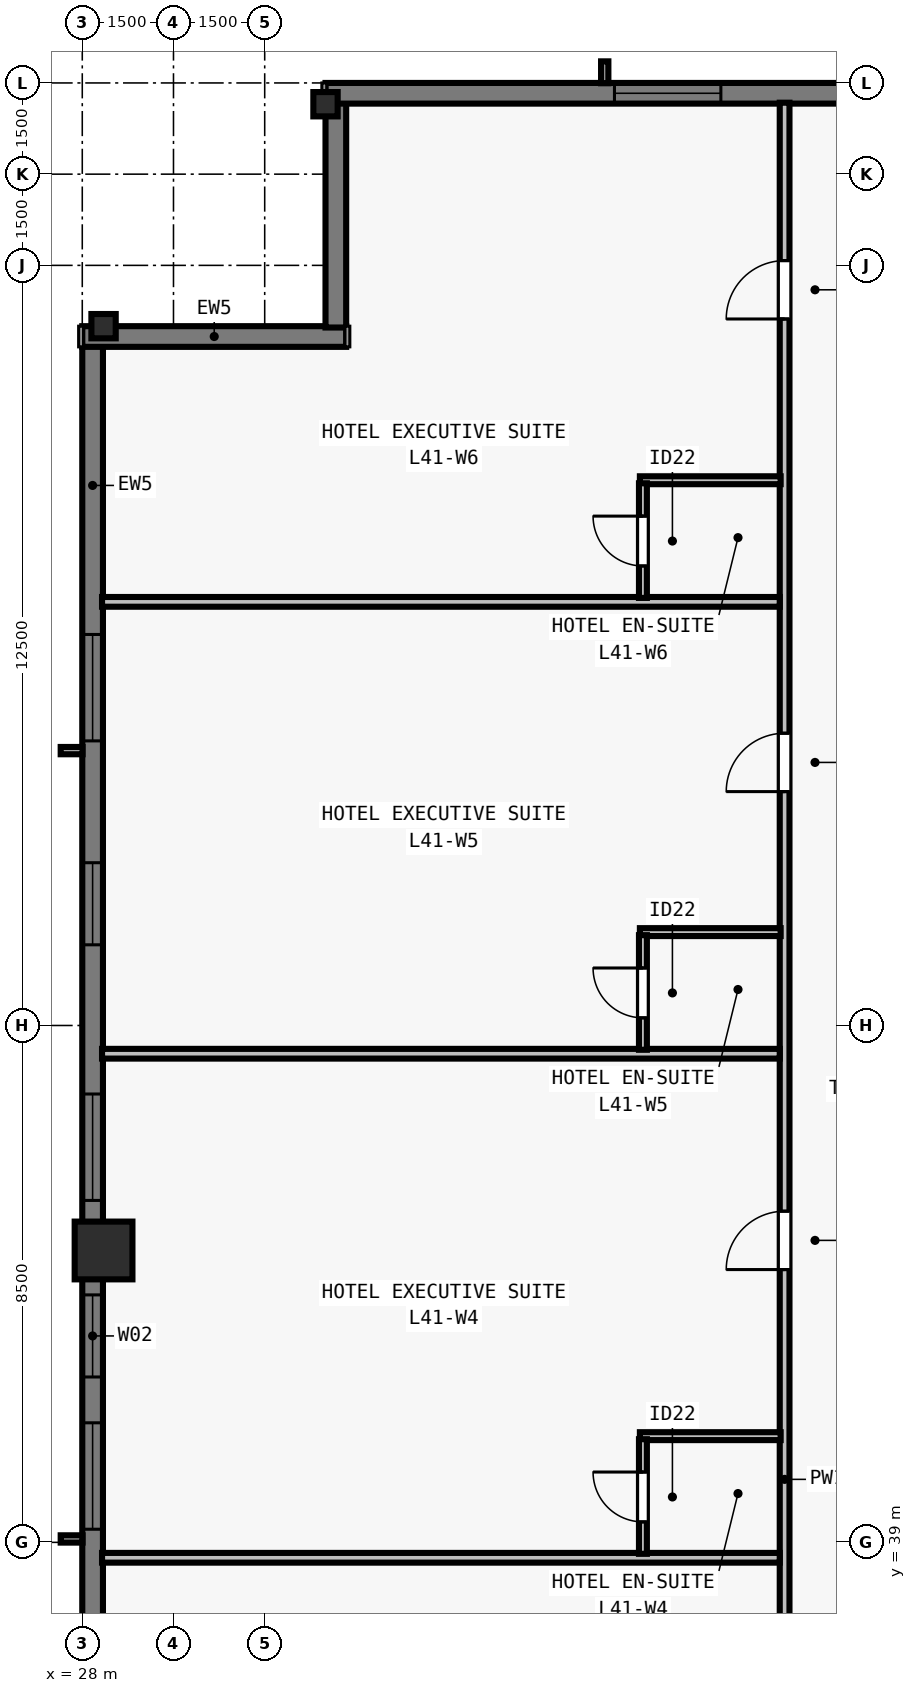
"""IFC4 building model, lengths in metres.
Left out: names, types, materials, properties, quantities, classifications, styles, units other than length and angle.
Written with IfcOpenShell. Run it as: python <this file> out.ifc"""

import sys

from ifc_helpers import new_model, si_unit, direction, frame, frame_2d, origin, origin_2d, place, context, subcontext, project, spatial, rectangle, i_section, extrude, element, fill, save


model = new_model("IFC4")
c1 = context("Model", 3, precision=1e-05, world=origin(), true_north=direction((0.0, 1.0)))
c2 = subcontext(c1, "Body", "Model", "MODEL_VIEW")
j1 = project(units=[si_unit("LENGTHUNIT", "METRE"), si_unit("PLANEANGLEUNIT", "RADIAN")], contexts=[c1])
p1 = place(None, origin())
s1 = spatial("IfcSite", under=j1, at=p1, CompositionType="ELEMENT")
p2 = place(p1, origin())
s2 = spatial("IfcBuilding", under=s1, at=p2, CompositionType="ELEMENT")
p3 = place(p2, frame((0.0, 0.0, 151.5)))
s3 = spatial("IfcBuildingStorey", under=s2, at=p3, CompositionType="ELEMENT", Elevation=151.5)
for number, where, z_axis, x_axis in (
    (1, (32.0, 62.65, 0.0), (0.0, 0.0, 1.0), (1.0, 0.0, 0.0)),
    (2, (28.35, 59.0, 0.0), (0.0, 0.0, 1.0), (0.0, 1.0, 0.0)),
):
    element("IfcColumn", number, at=place(p3, frame(where, z_axis=z_axis, x_axis=x_axis)), inside=s3, PredefinedType="COLUMN", context=c2, shape_type="SweptSolid", body=[
        extrude(i_section(OverallWidth=0.4, OverallDepth=0.4, WebThickness=0.022, FlangeThickness=0.036, at=origin_2d()), origin(), (0.0, 0.0, 1.0), 3.5),
    ])
p4 = place(p3, frame((28.35, 43.8, 0.0), z_axis=(0.0, 0.0, 1.0), x_axis=(0.0, 1.0, 0.0)))
e3 = element("IfcColumn", 3, at=p4, inside=s3, PredefinedType="COLUMN", context=c2, shape_type="SweptSolid", body=[
    extrude(rectangle(XDim=0.95, YDim=0.95, at=origin_2d()), origin(), (0.0, 0.0, 1.0), 3.5),
])
p5 = place(p3, frame((28.17, 19.0, 0.0), z_axis=(0.0, 0.0, 1.0), x_axis=(0.0, 1.0, 0.0)))
e4 = element("IfcWall", 4, at=p5, inside=s3, PredefinedType="SOLIDWALL", context=c2, shape_type="SweptSolid", body=[
    extrude(rectangle(XDim=39.682, YDim=0.34, at=frame_2d((19.841, 0.0))), origin(), (0.0, 0.0, 1.0), 3.28),
])
p6 = place(p5, frame((4.752, 0.0, 0.8)))
e5 = element("IfcOpeningElement", 5, at=p6, cuts=e4, PredefinedType="OPENING", context=c2, shape_type="SweptSolid", body=[
    extrude(rectangle(XDim=1.75, YDim=1.66, at=frame_2d((0.875, 0.83))), frame((0.0, 0.18, 0.0), z_axis=(0.0, -1.0, 0.0), x_axis=(1.0, 0.0, 0.0)), (0.0, 0.0, 1.0), 0.36),
])
p7 = place(p5, frame((8.505, 0.0, 0.8)))
e6 = element("IfcOpeningElement", 6, at=p7, cuts=e4, PredefinedType="OPENING", context=c2, shape_type="SweptSolid", body=[
    extrude(rectangle(XDim=1.35, YDim=1.66, at=frame_2d((0.675, 0.83))), frame((0.0, 0.18, 0.0), z_axis=(0.0, -1.0, 0.0), x_axis=(1.0, 0.0, 0.0)), (0.0, 0.0, 1.0), 0.36),
])
p8 = place(p5, frame((12.709, 0.0, 0.8)))
e7 = element("IfcOpeningElement", 7, at=p8, cuts=e4, PredefinedType="OPENING", context=c2, shape_type="SweptSolid", body=[
    extrude(rectangle(XDim=1.75, YDim=1.66, at=frame_2d((0.875, 0.83))), frame((0.0, 0.18, 0.0), z_axis=(0.0, -1.0, 0.0), x_axis=(1.0, 0.0, 0.0)), (0.0, 0.0, 1.0), 0.36),
])
p9 = place(p5, frame((16.062, 0.0, 0.8)))
e8 = element("IfcOpeningElement", 8, at=p9, cuts=e4, PredefinedType="OPENING", context=c2, shape_type="SweptSolid", body=[
    extrude(rectangle(XDim=1.35, YDim=1.66, at=frame_2d((0.675, 0.83))), frame((0.0, 0.18, 0.0), z_axis=(0.0, -1.0, 0.0), x_axis=(1.0, 0.0, 0.0)), (0.0, 0.0, 1.0), 0.36),
])
p10 = place(p5, frame((20.216, 0.0, 0.8)))
e9 = element("IfcOpeningElement", 9, at=p10, cuts=e4, PredefinedType="OPENING", context=c2, shape_type="SweptSolid", body=[
    extrude(rectangle(XDim=1.75, YDim=1.66, at=frame_2d((0.875, 0.83))), frame((0.0, 0.18, 0.0), z_axis=(0.0, -1.0, 0.0), x_axis=(1.0, 0.0, 0.0)), (0.0, 0.0, 1.0), 0.36),
])
p11 = place(p5, frame((22.719, 0.0, 0.8)))
e10 = element("IfcOpeningElement", 10, at=p11, cuts=e4, PredefinedType="OPENING", context=c2, shape_type="SweptSolid", body=[
    extrude(rectangle(XDim=1.35, YDim=1.66, at=frame_2d((0.675, 0.83))), frame((0.0, 0.18, 0.0), z_axis=(0.0, -1.0, 0.0), x_axis=(1.0, 0.0, 0.0)), (0.0, 0.0, 1.0), 0.36),
])
p12 = place(p5, frame((25.623, 0.0, 0.8)))
e11 = element("IfcOpeningElement", 11, at=p12, cuts=e4, PredefinedType="OPENING", context=c2, shape_type="SweptSolid", body=[
    extrude(rectangle(XDim=1.75, YDim=1.66, at=frame_2d((0.875, 0.83))), frame((0.0, 0.18, 0.0), z_axis=(0.0, -1.0, 0.0), x_axis=(1.0, 0.0, 0.0)), (0.0, 0.0, 1.0), 0.36),
])
p13 = place(p5, frame((29.827, 0.0, 0.8)))
e12 = element("IfcOpeningElement", 12, at=p13, cuts=e4, PredefinedType="OPENING", context=c2, shape_type="SweptSolid", body=[
    extrude(rectangle(XDim=1.35, YDim=1.66, at=frame_2d((0.675, 0.83))), frame((0.0, 0.18, 0.0), z_axis=(0.0, -1.0, 0.0), x_axis=(1.0, 0.0, 0.0)), (0.0, 0.0, 1.0), 0.36),
])
p14 = place(p5, frame((33.18, 0.0, 0.8)))
e13 = element("IfcOpeningElement", 13, at=p14, cuts=e4, PredefinedType="OPENING", context=c2, shape_type="SweptSolid", body=[
    extrude(rectangle(XDim=1.75, YDim=1.66, at=frame_2d((0.875, 0.83))), frame((0.0, 0.18, 0.0), z_axis=(0.0, -1.0, 0.0), x_axis=(1.0, 0.0, 0.0)), (0.0, 0.0, 1.0), 0.36),
])
p15 = place(p3, frame((28.0, 58.83, 0.0), z_axis=(0.0, 0.0, 1.0), x_axis=(1.0, 0.0, 0.0)))
e14 = element("IfcWall", 14, at=p15, inside=s3, PredefinedType="SOLIDWALL", context=c2, shape_type="SweptSolid", body=[
    extrude(rectangle(XDim=4.34, YDim=0.34, at=frame_2d((2.17, 0.0))), origin(), (0.0, 0.0, 1.0), 3.28),
])
p16 = place(p3, frame((32.17, 58.978, 0.0), z_axis=(0.0, 0.0, 1.0), x_axis=(0.0, 1.0, 0.0)))
e15 = element("IfcWall", 15, at=p16, inside=s3, PredefinedType="SOLIDWALL", context=c2, shape_type="SweptSolid", body=[
    extrude(rectangle(XDim=3.704, YDim=0.34, at=frame_2d((1.852, 0.0))), origin(), (0.0, 0.0, 1.0), 3.28),
])
p17 = place(p3, frame((32.0, 62.83, 0.0), z_axis=(0.0, 0.0, 1.0), x_axis=(1.0, 0.0, 0.0)))
e16 = element("IfcWall", 16, at=p17, inside=s3, PredefinedType="SOLIDWALL", context=c2, shape_type="SweptSolid", body=[
    extrude(rectangle(XDim=39.682, YDim=0.34, at=frame_2d((19.841, 0.0))), origin(), (0.0, 0.0, 1.0), 3.28),
])
p18 = place(p17, frame((4.752, 0.0, 0.8)))
e17 = element("IfcOpeningElement", 17, at=p18, cuts=e16, PredefinedType="OPENING", context=c2, shape_type="SweptSolid", body=[
    extrude(rectangle(XDim=1.75, YDim=1.66, at=frame_2d((0.875, 0.83))), frame((0.0, 0.18, 0.0), z_axis=(0.0, -1.0, 0.0), x_axis=(1.0, 0.0, 0.0)), (0.0, 0.0, 1.0), 0.36),
])
p19 = place(p17, frame((11.859, 0.0, 0.8)))
e18 = element("IfcOpeningElement", 18, at=p19, cuts=e16, PredefinedType="OPENING", context=c2, shape_type="SweptSolid", body=[
    extrude(rectangle(XDim=1.75, YDim=1.66, at=frame_2d((0.875, 0.83))), frame((0.0, 0.18, 0.0), z_axis=(0.0, -1.0, 0.0), x_axis=(1.0, 0.0, 0.0)), (0.0, 0.0, 1.0), 0.36),
])
p20 = place(p17, frame((16.062, 0.0, 0.8)))
e19 = element("IfcOpeningElement", 19, at=p20, cuts=e16, PredefinedType="OPENING", context=c2, shape_type="SweptSolid", body=[
    extrude(rectangle(XDim=1.35, YDim=1.66, at=frame_2d((0.675, 0.83))), frame((0.0, 0.18, 0.0), z_axis=(0.0, -1.0, 0.0), x_axis=(1.0, 0.0, 0.0)), (0.0, 0.0, 1.0), 0.36),
])
p21 = place(p17, frame((17.716, 0.0, 0.8)))
e20 = element("IfcOpeningElement", 20, at=p21, cuts=e16, PredefinedType="OPENING", context=c2, shape_type="SweptSolid", body=[
    extrude(rectangle(XDim=1.75, YDim=1.66, at=frame_2d((0.875, 0.83))), frame((0.0, 0.18, 0.0), z_axis=(0.0, -1.0, 0.0), x_axis=(1.0, 0.0, 0.0)), (0.0, 0.0, 1.0), 0.36),
])
p22 = place(p17, frame((22.719, 0.0, 0.8)))
e21 = element("IfcOpeningElement", 21, at=p22, cuts=e16, PredefinedType="OPENING", context=c2, shape_type="SweptSolid", body=[
    extrude(rectangle(XDim=1.35, YDim=1.66, at=frame_2d((0.675, 0.83))), frame((0.0, 0.18, 0.0), z_axis=(0.0, -1.0, 0.0), x_axis=(1.0, 0.0, 0.0)), (0.0, 0.0, 1.0), 0.36),
])
p23 = place(p17, frame((26.073, 0.0, 0.8)))
e22 = element("IfcOpeningElement", 22, at=p23, cuts=e16, PredefinedType="OPENING", context=c2, shape_type="SweptSolid", body=[
    extrude(rectangle(XDim=1.75, YDim=1.66, at=frame_2d((0.875, 0.83))), frame((0.0, 0.18, 0.0), z_axis=(0.0, -1.0, 0.0), x_axis=(1.0, 0.0, 0.0)), (0.0, 0.0, 1.0), 0.36),
])
p24 = place(p17, frame((29.827, 0.0, 0.8)))
e23 = element("IfcOpeningElement", 23, at=p24, cuts=e16, PredefinedType="OPENING", context=c2, shape_type="SweptSolid", body=[
    extrude(rectangle(XDim=1.35, YDim=1.66, at=frame_2d((0.675, 0.83))), frame((0.0, 0.18, 0.0), z_axis=(0.0, -1.0, 0.0), x_axis=(1.0, 0.0, 0.0)), (0.0, 0.0, 1.0), 0.36),
])
p25 = place(p3, frame((39.55, 15.325, 0.0), z_axis=(0.0, 0.0, 1.0), x_axis=(0.0, 1.0, 0.0)))
e24 = element("IfcWall", 24, at=p25, inside=s3, PredefinedType="PARTITIONING", context=c2, shape_type="SweptSolid", body=[
    extrude(rectangle(XDim=47.35, YDim=0.16, at=frame_2d((23.675, 0.0))), origin(), (0.0, 0.0, 1.0), 2.555),
])
p26 = place(p25, frame((4.718, 0.0, 0.0)))
e25 = element("IfcOpeningElement", 25, at=p26, cuts=e24, PredefinedType="OPENING", context=c2, shape_type="SweptSolid", body=[
    extrude(rectangle(XDim=0.96, YDim=2.15, at=frame_2d((0.48, 1.075))), frame((0.0, 0.09, 0.0), z_axis=(0.0, -1.0, 0.0), x_axis=(1.0, 0.0, 0.0)), (0.0, 0.0, 1.0), 0.18),
])
p27 = place(p25, frame((12.441, 0.0, 0.0)))
e26 = element("IfcOpeningElement", 26, at=p27, cuts=e24, PredefinedType="OPENING", context=c2, shape_type="SweptSolid", body=[
    extrude(rectangle(XDim=0.96, YDim=2.15, at=frame_2d((0.48, 1.075))), frame((0.0, 0.09, 0.0), z_axis=(0.0, -1.0, 0.0), x_axis=(1.0, 0.0, 0.0)), (0.0, 0.0, 1.0), 0.18),
])
p28 = place(p25, frame((20.301, 0.0, 0.0)))
e27 = element("IfcOpeningElement", 27, at=p28, cuts=e24, PredefinedType="OPENING", context=c2, shape_type="SweptSolid", body=[
    extrude(rectangle(XDim=0.96, YDim=2.15, at=frame_2d((0.48, 1.075))), frame((0.0, 0.09, 0.0), z_axis=(0.0, -1.0, 0.0), x_axis=(1.0, 0.0, 0.0)), (0.0, 0.0, 1.0), 0.18),
])
p29 = place(p25, frame((28.161, 0.0, 0.0)))
e28 = element("IfcOpeningElement", 28, at=p29, cuts=e24, PredefinedType="OPENING", context=c2, shape_type="SweptSolid", body=[
    extrude(rectangle(XDim=0.96, YDim=2.15, at=frame_2d((0.48, 1.075))), frame((0.0, 0.09, 0.0), z_axis=(0.0, -1.0, 0.0), x_axis=(1.0, 0.0, 0.0)), (0.0, 0.0, 1.0), 0.18),
])
p30 = place(p25, frame((36.021, 0.0, 0.0)))
e29 = element("IfcOpeningElement", 29, at=p30, cuts=e24, PredefinedType="OPENING", context=c2, shape_type="SweptSolid", body=[
    extrude(rectangle(XDim=0.96, YDim=2.15, at=frame_2d((0.48, 1.075))), frame((0.0, 0.09, 0.0), z_axis=(0.0, -1.0, 0.0), x_axis=(1.0, 0.0, 0.0)), (0.0, 0.0, 1.0), 0.18),
])
p31 = place(p25, frame((43.793, 0.0, 0.0)))
e30 = element("IfcOpeningElement", 30, at=p31, cuts=e24, PredefinedType="OPENING", context=c2, shape_type="SweptSolid", body=[
    extrude(rectangle(XDim=0.96, YDim=2.15, at=frame_2d((0.48, 1.075))), frame((0.0, 0.09, 0.0), z_axis=(0.0, -1.0, 0.0), x_axis=(1.0, 0.0, 0.0)), (0.0, 0.0, 1.0), 0.18),
])
p32 = place(p3, frame((28.325, 38.747, 0.0), z_axis=(0.0, 0.0, 1.0), x_axis=(1.0, 0.0, 0.0)))
e31 = element("IfcWall", 31, at=p32, inside=s3, PredefinedType="PARTITIONING", context=c2, shape_type="SweptSolid", body=[
    extrude(rectangle(XDim=11.145, YDim=0.16, at=frame_2d((5.573, 0.0))), origin(), (0.0, 0.0, 1.0), 2.896),
])
p33 = place(p3, frame((37.17, 40.747, 0.0), z_axis=(0.0, 0.0, 1.0), x_axis=(1.0, 0.0, 0.0)))
e32 = element("IfcWall", 32, at=p33, inside=s3, PredefinedType="PLUMBINGWALL", context=c2, shape_type="SweptSolid", body=[
    extrude(rectangle(XDim=2.315, YDim=0.13, at=frame_2d((1.158, 0.0))), origin(), (0.0, 0.0, 1.0), 3.28),
])
p34 = place(p3, frame((37.22, 38.812, 0.0), z_axis=(0.0, 0.0, 1.0), x_axis=(0.0, 1.0, 0.0)))
e33 = element("IfcWall", 33, at=p34, inside=s3, PredefinedType="PLUMBINGWALL", context=c2, shape_type="SweptSolid", body=[
    extrude(rectangle(XDim=1.885, YDim=0.13, at=frame_2d((0.942, 0.0))), origin(), (0.0, 0.0, 1.0), 3.28),
])
p35 = place(p34, frame((0.525, 0.0, 0.0)))
e34 = element("IfcOpeningElement", 34, at=p35, cuts=e33, PredefinedType="OPENING", context=c2, shape_type="SweptSolid", body=[
    extrude(rectangle(XDim=0.82, YDim=2.1, at=frame_2d((0.41, 1.05))), frame((0.0, 0.075, 0.0), z_axis=(0.0, -1.0, 0.0), x_axis=(1.0, 0.0, 0.0)), (0.0, 0.0, 1.0), 0.15),
])
p36 = place(p3, frame((28.325, 47.035, 0.0), z_axis=(0.0, 0.0, 1.0), x_axis=(1.0, 0.0, 0.0)))
e35 = element("IfcWall", 35, at=p36, inside=s3, PredefinedType="PARTITIONING", context=c2, shape_type="SweptSolid", body=[
    extrude(rectangle(XDim=11.145, YDim=0.16, at=frame_2d((5.573, 0.0))), origin(), (0.0, 0.0, 1.0), 3.28),
])
p37 = place(p3, frame((37.17, 49.035, 0.0), z_axis=(0.0, 0.0, 1.0), x_axis=(1.0, 0.0, 0.0)))
e36 = element("IfcWall", 36, at=p37, inside=s3, PredefinedType="PLUMBINGWALL", context=c2, shape_type="SweptSolid", body=[
    extrude(rectangle(XDim=2.315, YDim=0.13, at=frame_2d((1.158, 0.0))), origin(), (0.0, 0.0, 1.0), 3.28),
])
p38 = place(p3, frame((37.22, 47.101, 0.0), z_axis=(0.0, 0.0, 1.0), x_axis=(0.0, 1.0, 0.0)))
e37 = element("IfcWall", 37, at=p38, inside=s3, PredefinedType="PLUMBINGWALL", context=c2, shape_type="SweptSolid", body=[
    extrude(rectangle(XDim=1.885, YDim=0.13, at=frame_2d((0.942, 0.0))), origin(), (0.0, 0.0, 1.0), 3.28),
])
p39 = place(p38, frame((0.525, 0.0, 0.0)))
e38 = element("IfcOpeningElement", 38, at=p39, cuts=e37, PredefinedType="OPENING", context=c2, shape_type="SweptSolid", body=[
    extrude(rectangle(XDim=0.82, YDim=2.1, at=frame_2d((0.41, 1.05))), frame((0.0, 0.075, 0.0), z_axis=(0.0, -1.0, 0.0), x_axis=(1.0, 0.0, 0.0)), (0.0, 0.0, 1.0), 0.15),
])
p40 = place(p3, frame((28.325, 54.467, 0.0), z_axis=(0.0, 0.0, 1.0), x_axis=(1.0, 0.0, 0.0)))
e39 = element("IfcWall", 39, at=p40, inside=s3, PredefinedType="PARTITIONING", context=c2, shape_type="SweptSolid", body=[
    extrude(rectangle(XDim=11.145, YDim=0.16, at=frame_2d((5.573, 0.0))), origin(), (0.0, 0.0, 1.0), 2.896),
])
p41 = place(p3, frame((37.17, 56.467, 0.0), z_axis=(0.0, 0.0, 1.0), x_axis=(1.0, 0.0, 0.0)))
e40 = element("IfcWall", 40, at=p41, inside=s3, PredefinedType="PLUMBINGWALL", context=c2, shape_type="SweptSolid", body=[
    extrude(rectangle(XDim=2.315, YDim=0.13, at=frame_2d((1.158, 0.0))), origin(), (0.0, 0.0, 1.0), 3.28),
])
p42 = place(p3, frame((37.22, 54.531, 0.0), z_axis=(0.0, 0.0, 1.0), x_axis=(0.0, 1.0, 0.0)))
e41 = element("IfcWall", 41, at=p42, inside=s3, PredefinedType="PLUMBINGWALL", context=c2, shape_type="SweptSolid", body=[
    extrude(rectangle(XDim=1.885, YDim=0.13, at=frame_2d((0.942, 0.0))), origin(), (0.0, 0.0, 1.0), 2.555),
])
p43 = place(p42, frame((0.525, 0.0, 0.0)))
e42 = element("IfcOpeningElement", 42, at=p43, cuts=e41, PredefinedType="OPENING", context=c2, shape_type="SweptSolid", body=[
    extrude(rectangle(XDim=0.82, YDim=2.1, at=frame_2d((0.41, 1.05))), frame((0.0, 0.075, 0.0), z_axis=(0.0, -1.0, 0.0), x_axis=(1.0, 0.0, 0.0)), (0.0, 0.0, 1.0), 0.15),
])
p44 = place(p10, origin())
e43 = element("IfcWindow", 43, at=p44, inside=s3, PartitioningType="SINGLE_PANEL", PredefinedType="WINDOW", context=c2, shape_type="SweptSolid", body=[
    extrude(rectangle(XDim=1.75, YDim=1.66, at=frame_2d((0.875, 0.83))), frame((0.0, -0.05, 0.0), z_axis=(0.0, -1.0, 0.0), x_axis=(1.0, 0.0, 0.0)), (0.0, 0.0, 1.0), 0.06),
])
fill(e9, e43)
p45 = place(p11, origin())
e44 = element("IfcWindow", 44, at=p45, inside=s3, PartitioningType="SINGLE_PANEL", PredefinedType="WINDOW", context=c2, shape_type="SweptSolid", body=[
    extrude(rectangle(XDim=1.35, YDim=1.66, at=frame_2d((0.675, 0.83))), frame((0.0, -0.05, 0.0), z_axis=(0.0, -1.0, 0.0), x_axis=(1.0, 0.0, 0.0)), (0.0, 0.0, 1.0), 0.06),
])
fill(e10, e44)
p46 = place(p12, origin())
e45 = element("IfcWindow", 45, at=p46, inside=s3, PartitioningType="SINGLE_PANEL", PredefinedType="WINDOW", context=c2, shape_type="SweptSolid", body=[
    extrude(rectangle(XDim=1.75, YDim=1.66, at=frame_2d((0.875, 0.83))), frame((0.0, -0.05, 0.0), z_axis=(0.0, -1.0, 0.0), x_axis=(1.0, 0.0, 0.0)), (0.0, 0.0, 1.0), 0.06),
])
fill(e11, e45)
p47 = place(p13, origin())
e46 = element("IfcWindow", 46, at=p47, inside=s3, PartitioningType="SINGLE_PANEL", PredefinedType="WINDOW", context=c2, shape_type="SweptSolid", body=[
    extrude(rectangle(XDim=1.35, YDim=1.66, at=frame_2d((0.675, 0.83))), frame((0.0, -0.05, 0.0), z_axis=(0.0, -1.0, 0.0), x_axis=(1.0, 0.0, 0.0)), (0.0, 0.0, 1.0), 0.06),
])
fill(e12, e46)
p48 = place(p14, origin())
e47 = element("IfcWindow", 47, at=p48, inside=s3, PartitioningType="SINGLE_PANEL", PredefinedType="WINDOW", context=c2, shape_type="SweptSolid", body=[
    extrude(rectangle(XDim=1.75, YDim=1.66, at=frame_2d((0.875, 0.83))), frame((0.0, -0.05, 0.0), z_axis=(0.0, -1.0, 0.0), x_axis=(1.0, 0.0, 0.0)), (0.0, 0.0, 1.0), 0.06),
])
fill(e13, e47)
p49 = place(p18, origin())
e48 = element("IfcWindow", 48, at=p49, inside=s3, PartitioningType="SINGLE_PANEL", PredefinedType="WINDOW", context=c2, shape_type="SweptSolid", body=[
    extrude(rectangle(XDim=1.75, YDim=1.66, at=frame_2d((0.875, 0.83))), frame((0.0, -0.05, 0.0), z_axis=(0.0, -1.0, 0.0), x_axis=(1.0, 0.0, 0.0)), (0.0, 0.0, 1.0), 0.06),
])
fill(e17, e48)
p50 = place(p35, origin())
e49 = element("IfcDoor", 49, at=p50, inside=s3, OperationType="SINGLE_SWING_RIGHT", PredefinedType="DOOR", context=c2, shape_type="SweptSolid", body=[
    extrude(rectangle(XDim=0.82, YDim=2.1, at=frame_2d((0.41, 1.05))), frame((0.0, 0.025, 0.0), z_axis=(0.0, -1.0, 0.0), x_axis=(1.0, 0.0, 0.0)), (0.0, 0.0, 1.0), 0.05),
])
fill(e34, e49)
p51 = place(p29, origin())
e50 = element("IfcDoor", 50, at=p51, inside=s3, OperationType="SINGLE_SWING_LEFT", PredefinedType="DOOR", context=c2, shape_type="SweptSolid", body=[
    extrude(rectangle(XDim=0.96, YDim=2.15, at=frame_2d((0.48, 1.075))), frame((0.0, 0.025, 0.0), z_axis=(0.0, -1.0, 0.0), x_axis=(1.0, 0.0, 0.0)), (0.0, 0.0, 1.0), 0.05),
])
fill(e28, e50)
p52 = place(p39, origin())
e51 = element("IfcDoor", 51, at=p52, inside=s3, OperationType="SINGLE_SWING_RIGHT", PredefinedType="DOOR", context=c2, shape_type="SweptSolid", body=[
    extrude(rectangle(XDim=0.82, YDim=2.1, at=frame_2d((0.41, 1.05))), frame((0.0, 0.025, 0.0), z_axis=(0.0, -1.0, 0.0), x_axis=(1.0, 0.0, 0.0)), (0.0, 0.0, 1.0), 0.05),
])
fill(e38, e51)
p53 = place(p30, origin())
e52 = element("IfcDoor", 52, at=p53, inside=s3, OperationType="SINGLE_SWING_LEFT", PredefinedType="DOOR", context=c2, shape_type="SweptSolid", body=[
    extrude(rectangle(XDim=0.96, YDim=2.15, at=frame_2d((0.48, 1.075))), frame((0.0, 0.025, 0.0), z_axis=(0.0, -1.0, 0.0), x_axis=(1.0, 0.0, 0.0)), (0.0, 0.0, 1.0), 0.05),
])
fill(e29, e52)
p54 = place(p43, origin())
e53 = element("IfcDoor", 53, at=p54, inside=s3, OperationType="SINGLE_SWING_RIGHT", PredefinedType="DOOR", context=c2, shape_type="SweptSolid", body=[
    extrude(rectangle(XDim=0.82, YDim=2.1, at=frame_2d((0.41, 1.05))), frame((0.0, 0.025, 0.0), z_axis=(0.0, -1.0, 0.0), x_axis=(1.0, 0.0, 0.0)), (0.0, 0.0, 1.0), 0.05),
])
fill(e42, e53)
p55 = place(p31, origin())
e54 = element("IfcDoor", 54, at=p55, inside=s3, OperationType="SINGLE_SWING_LEFT", PredefinedType="DOOR", context=c2, shape_type="SweptSolid", body=[
    extrude(rectangle(XDim=0.96, YDim=2.15, at=frame_2d((0.48, 1.075))), frame((0.0, 0.025, 0.0), z_axis=(0.0, -1.0, 0.0), x_axis=(1.0, 0.0, 0.0)), (0.0, 0.0, 1.0), 0.05),
])
fill(e30, e54)
save(model, sys.argv[1])
